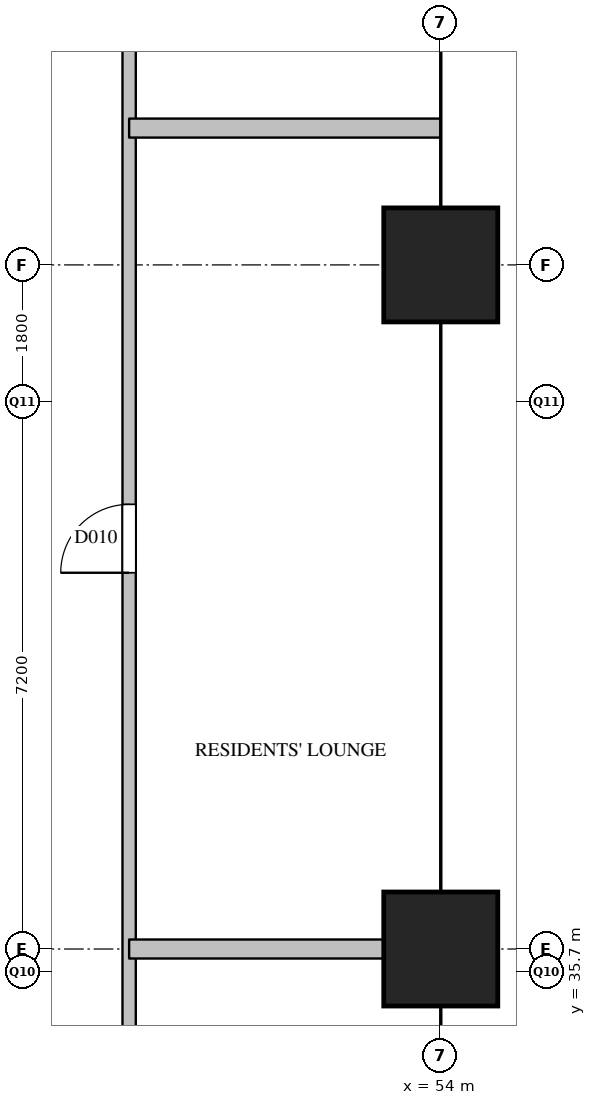
"""IFC4 building model, lengths in metres.
Left out: names, types, materials, properties, quantities, classifications, styles, units other than length and angle.
Written with IfcOpenShell. Run it as: python <this file> out.ifc"""

import sys

from ifc_helpers import new_model, si_unit, direction, frame, frame_2d, origin, origin_2d, place, context, subcontext, project, spatial, rectangle, extrude, element, fill, save


model = new_model("IFC4")
c1 = context("Model", 3, precision=1e-05, world=origin(), true_north=direction((0.0, 1.0)))
c2 = subcontext(c1, "Body", "Model", "MODEL_VIEW")
j1 = project(units=[si_unit("LENGTHUNIT", "METRE"), si_unit("PLANEANGLEUNIT", "RADIAN")], contexts=[c1])
p1 = place(None, origin())
s1 = spatial("IfcSite", under=j1, at=p1, CompositionType="ELEMENT")
p2 = place(p1, origin())
s2 = spatial("IfcBuilding", under=s1, at=p2, CompositionType="ELEMENT")
p3 = place(p2, frame((0.0, 0.0, 146.6)))
s3 = spatial("IfcBuildingStorey", under=s2, at=p3, CompositionType="ELEMENT", Elevation=146.6)
for number, where, z_axis, x_axis in (
    (1, (54.0, 36.0, 0.0), (0.0, 0.0, 1.0), (1.0, 0.0, 0.0)),
    (2, (54.0, 45.0, 0.0), (0.0, 0.0, 1.0), (1.0, 0.0, 0.0)),
):
    element("IfcColumn", number, at=place(p3, frame(where, z_axis=z_axis, x_axis=x_axis)), inside=s3, PredefinedType="COLUMN", context=c2, shape_type="SweptSolid", body=[
        extrude(rectangle(XDim=1.5, YDim=1.5, at=origin_2d()), origin(), (0.0, 0.0, 1.0), 3.9),
    ])
p4 = place(p3, frame((49.9, 28.5, 0.0), z_axis=(0.0, 0.0, 1.0), x_axis=(0.0, 1.0, 0.0)))
e3 = element("IfcWall", 3, at=p4, inside=s3, PredefinedType="PARTITIONING", context=c2, shape_type="SweptSolid", body=[
    extrude(rectangle(XDim=23.0, YDim=0.175, at=frame_2d((11.5, 0.0))), origin(), (0.0, 0.0, 1.0), 3.6),
])
p5 = place(p4, frame((3.3, 0.0, 0.0)))
e4 = element("IfcOpeningElement", 4, at=p5, cuts=e3, PredefinedType="OPENING", context=c2, shape_type="SweptSolid", body=[
    extrude(rectangle(XDim=0.9, YDim=2.1, at=frame_2d((0.45, 1.05))), frame((0.0, 0.097, 0.0), z_axis=(0.0, -1.0, 0.0), x_axis=(1.0, 0.0, 0.0)), (0.0, 0.0, 1.0), 0.195),
])
p6 = place(p4, frame((12.45, 0.0, 0.0)))
e5 = element("IfcOpeningElement", 5, at=p6, cuts=e3, PredefinedType="OPENING", context=c2, shape_type="SweptSolid", body=[
    extrude(rectangle(XDim=0.9, YDim=2.1, at=frame_2d((0.45, 1.05))), frame((0.0, 0.097, 0.0), z_axis=(0.0, -1.0, 0.0), x_axis=(1.0, 0.0, 0.0)), (0.0, 0.0, 1.0), 0.195),
])
p7 = place(p4, frame((20.2, 0.0, 0.0)))
e6 = element("IfcOpeningElement", 6, at=p7, cuts=e3, PredefinedType="OPENING", context=c2, shape_type="SweptSolid", body=[
    extrude(rectangle(XDim=0.9, YDim=2.1, at=frame_2d((0.45, 1.05))), frame((0.0, 0.097, 0.0), z_axis=(0.0, -1.0, 0.0), x_axis=(1.0, 0.0, 0.0)), (0.0, 0.0, 1.0), 0.195),
])
p8 = place(p3, frame((49.9, 36.0, 0.0), z_axis=(0.0, 0.0, 1.0), x_axis=(1.0, 0.0, 0.0)))
e7 = element("IfcWall", 7, at=p8, inside=s3, PredefinedType="PARTITIONING", context=c2, shape_type="SweptSolid", body=[
    extrude(rectangle(XDim=4.1, YDim=0.25, at=frame_2d((2.05, 0.0))), origin(), (0.0, 0.0, 1.0), 3.6),
])
p9 = place(p3, frame((49.9, 46.8, 0.0), z_axis=(0.0, 0.0, 1.0), x_axis=(1.0, 0.0, 0.0)))
e8 = element("IfcWall", 8, at=p9, inside=s3, PredefinedType="PARTITIONING", context=c2, shape_type="SweptSolid", body=[
    extrude(rectangle(XDim=4.1, YDim=0.25, at=frame_2d((2.05, 0.0))), origin(), (0.0, 0.0, 1.0), 2.6),
])
p10 = place(p6, origin())
e9 = element("IfcDoor", 9, at=p10, inside=s3, OperationType="SINGLE_SWING_LEFT", PredefinedType="DOOR", context=c2, shape_type="SweptSolid", body=[
    extrude(rectangle(XDim=0.9, YDim=2.1, at=frame_2d((0.45, 1.05))), frame((0.0, 0.025, 0.0), z_axis=(0.0, -1.0, 0.0), x_axis=(1.0, 0.0, 0.0)), (0.0, 0.0, 1.0), 0.05),
])
fill(e5, e9)
save(model, sys.argv[1])
